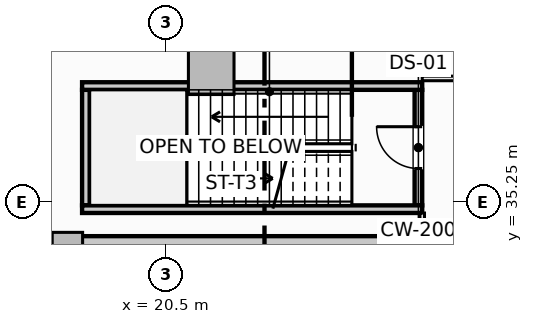
"""IFC4 building model, lengths in metres.
Left out: names, types, materials, properties, quantities, classifications, styles, units other than length and angle.
Written with IfcOpenShell. Run it as: python <this file> out.ifc"""

import sys

from ifc_helpers import new_model, si_unit, direction, frame, frame_2d, origin, origin_2d, place, context, subcontext, project, spatial, rectangle, extrude, element, fill, save


model = new_model("IFC4")
c1 = context("Model", 3, precision=1e-05, world=origin(), true_north=direction((0.0, 1.0)))
c2 = subcontext(c1, "Body", "Model", "MODEL_VIEW")
j1 = project(units=[si_unit("LENGTHUNIT", "METRE"), si_unit("PLANEANGLEUNIT", "RADIAN")], contexts=[c1])
p1 = place(None, origin())
s1 = spatial("IfcSite", under=j1, at=p1, CompositionType="ELEMENT")
p2 = place(p1, origin())
s2 = spatial("IfcBuilding", under=s1, at=p2, CompositionType="ELEMENT")
p3 = place(p2, origin())
s3 = spatial("IfcBuildingStorey", under=s2, at=p3, CompositionType="ELEMENT", Elevation=0.0)
p4 = place(p3, frame((14.075, 33.925, -0.36), z_axis=(0.0, 0.0, 1.0), x_axis=(1.0, 0.0, 0.0)))
e1 = element("IfcWall", 1, at=p4, inside=s3, PredefinedType="SHEAR", context=c2, shape_type="SweptSolid", body=[
    extrude(rectangle(XDim=13.85, YDim=0.85, at=frame_2d((6.925, 0.0))), origin(), (0.0, 0.0, 1.0), 5.1),
])
p5 = place(p3, frame((21.698, 38.677, -0.36), z_axis=(0.0, 0.0, 1.0), x_axis=(1.0, 0.0, 0.0)))
e2 = element("IfcColumn", 2, at=p5, inside=s3, PredefinedType="COLUMN", context=c2, shape_type="SweptSolid", body=[
    extrude(rectangle(XDim=1.2, YDim=1.2, at=origin_2d()), origin(), (0.0, 0.0, 1.0), 5.1),
])
p6 = place(p3, frame((17.914, 34.05, -0.36), z_axis=(0.0, 0.0, 1.0), x_axis=(1.0, 0.0, 0.0)))
e3 = element("IfcColumn", 3, at=p6, inside=s3, PredefinedType="PILASTER", context=c2, shape_type="SweptSolid", body=[
    extrude(rectangle(XDim=0.8, YDim=0.8, at=origin_2d()), origin(), (0.0, 0.0, 1.0), 5.1),
])
p7 = place(p3, frame((27.15, 35.16, -0.36), z_axis=(0.0, 0.0, 1.0), x_axis=(0.0, 1.0, 0.0)))
e4 = element("IfcWall", 4, at=p7, inside=s3, PredefinedType="SHEAR", context=c2, shape_type="SweptSolid", body=[
    extrude(rectangle(XDim=3.04, YDim=0.2, at=frame_2d((1.52, 0.0))), origin(), (0.0, 0.0, 1.0), 5.1),
])
p8 = place(p7, frame((0.97, 0.0, 0.36)))
e5 = element("IfcOpeningElement", 5, at=p8, cuts=e4, PredefinedType="OPENING", context=c2, shape_type="SweptSolid", body=[
    extrude(rectangle(XDim=1.1, YDim=2.15, at=frame_2d((0.55, 1.075))), frame((0.0, 0.11, 0.0), z_axis=(0.0, -1.0, 0.0), x_axis=(1.0, 0.0, 0.0)), (0.0, 0.0, 1.0), 0.22),
])
p9 = place(p3, frame((18.4, 35.16, -0.36), z_axis=(0.0, 0.0, 1.0), x_axis=(0.0, 1.0, 0.0)))
e6 = element("IfcWall", 6, at=p9, inside=s3, PredefinedType="SHEAR", context=c2, shape_type="SweptSolid", body=[
    extrude(rectangle(XDim=3.04, YDim=0.2, at=frame_2d((1.52, 0.0))), origin(), (0.0, 0.0, 1.0), 5.1),
])
for number, where, z_axis, x_axis in (
    (7, (18.3, 38.3, -0.36), (0.0, 0.0, 1.0), (1.0, 0.0, 0.0)),
    (8, (18.3, 35.06, -0.36), (0.0, 0.0, 1.0), (1.0, 0.0, 0.0)),
):
    element("IfcWall", number, at=place(p3, frame(where, z_axis=z_axis, x_axis=x_axis)), inside=s3, PredefinedType="SHEAR", context=c2, shape_type="SweptSolid", body=[
        extrude(rectangle(XDim=8.95, YDim=0.2, at=frame_2d((4.475, 0.0))), origin(), (0.0, 0.0, 1.0), 5.1),
    ])
p10 = place(p3, frame((27.25, 34.352, 0.0), z_axis=(0.0, 0.0, 1.0), x_axis=(0.0, 1.0, 0.0)))
e9 = element("IfcWall", 9, at=p10, inside=s3, PredefinedType="PARTITIONING", context=c2, shape_type="SweptSolid", body=[
    extrude(rectangle(XDim=0.606, YDim=0.12, at=frame_2d((0.303, 0.0))), origin(), (0.0, 0.0, 1.0), 4.74),
])
p11 = place(p3, frame((27.25, 38.5, 0.0), z_axis=(0.0, 0.0, 1.0), x_axis=(1.0, 0.0, 0.0)))
e10 = element("IfcWall", 10, at=p11, inside=s3, PredefinedType="PARTITIONING", context=c2, shape_type="SweptSolid", body=[
    extrude(rectangle(XDim=2.53, YDim=0.12, at=frame_2d((1.265, 0.0))), origin(), (0.0, 0.0, 1.0), 4.74),
])
p12 = place(p8, origin())
e11 = element("IfcDoor", 11, at=p12, inside=s3, OperationType="SINGLE_SWING_RIGHT", PredefinedType="DOOR", context=c2, shape_type="SweptSolid", body=[
    extrude(rectangle(XDim=1.1, YDim=2.15, at=frame_2d((0.55, 1.075))), frame((0.0, 0.025, 0.0), z_axis=(0.0, -1.0, 0.0), x_axis=(1.0, 0.0, 0.0)), (0.0, 0.0, 1.0), 0.05),
])
fill(e5, e11)
save(model, sys.argv[1])
